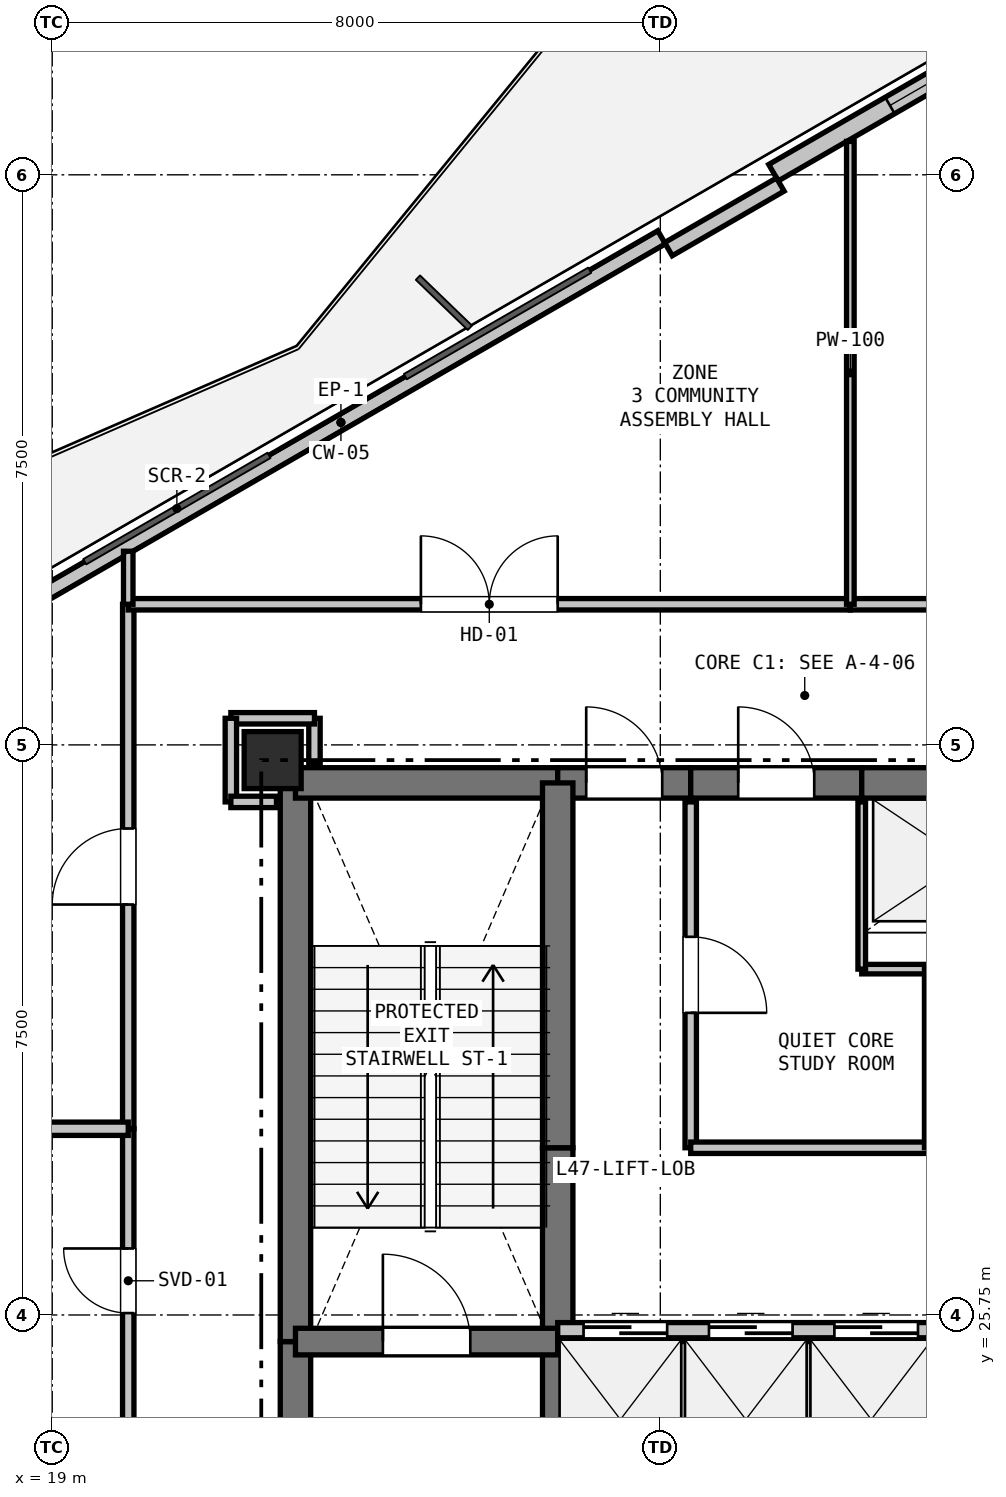
"""IFC4 building model, lengths in metres.
Left out: names, types, materials, properties, quantities, classifications, styles, units other than length and angle.
Written with IfcOpenShell. Run it as: python <this file> out.ifc"""

import sys

from ifc_helpers import new_model, si_unit, direction, frame, frame_2d, origin, origin_2d, place, context, subcontext, project, spatial, rectangle, extrude, element, fill, save


model = new_model("IFC4")
c1 = context("Model", 3, precision=1e-05, world=origin(), true_north=direction((0.0, 1.0)))
c2 = subcontext(c1, "Body", "Model", "MODEL_VIEW")
j1 = project(units=[si_unit("LENGTHUNIT", "METRE"), si_unit("PLANEANGLEUNIT", "RADIAN")], contexts=[c1])
p1 = place(None, origin())
s1 = spatial("IfcSite", under=j1, at=p1, CompositionType="ELEMENT")
p2 = place(p1, origin())
s2 = spatial("IfcBuilding", under=s1, at=p2, CompositionType="ELEMENT")
p3 = place(p2, frame((0.0, 0.0, 170.7)))
s3 = spatial("IfcBuildingStorey", under=s2, at=p3, CompositionType="ELEMENT", Elevation=170.7)
p4 = place(p3, frame((21.9, 33.05, 0.0), z_axis=(0.0, 0.0, 1.0), x_axis=(1.0, 0.0, 0.0)))
e1 = element("IfcColumn", 1, at=p4, inside=s3, PredefinedType="COLUMN", context=c2, shape_type="SweptSolid", body=[
    extrude(rectangle(XDim=0.75, YDim=0.75, at=origin_2d()), origin(), (0.0, 0.0, 1.0), 4.8),
])
p5 = place(p3, frame((18.58, 35.056, 0.0), z_axis=(0.0, 0.0, 1.0), x_axis=(0.866026169916, 0.499998673018, 0.0)))
e2 = element("IfcWall", 2, at=p5, inside=s3, PredefinedType="PARAPET", context=c2, shape_type="SweptSolid", body=[
    extrude(rectangle(XDim=9.742, YDim=0.2, at=frame_2d((4.871, 0.0))), origin(), (0.0, 0.0, 1.0), 0.2),
])
p6 = place(p3, frame((28.489, 40.778, 0.0), z_axis=(0.0, 0.0, 1.0), x_axis=(0.866027516296, 0.499996341005, 0.0)))
e3 = element("IfcWall", 3, at=p6, inside=s3, PredefinedType="SOLIDWALL", context=c2, shape_type="SweptSolid", body=[
    extrude(rectangle(XDim=10.442, YDim=0.25, at=frame_2d((5.221, 0.0))), origin(), (0.0, 0.0, 1.0), 3.205),
])
p7 = place(p6, frame((1.769, 0.0, 0.9)))
e4 = element("IfcOpeningElement", 4, at=p7, cuts=e3, PredefinedType="OPENING", context=c2, shape_type="SweptSolid", body=[
    extrude(rectangle(XDim=2.4, YDim=2.2, at=frame_2d((1.2, 1.1))), frame((0.0, 0.135, 0.0), z_axis=(0.0, -1.0, 0.0), x_axis=(1.0, 0.0, 0.0)), (0.0, 0.0, 1.0), 0.27),
])
p8 = place(p3, frame((27.107, 39.772, 0.0), z_axis=(0.0, 0.0, 1.0), x_axis=(0.866087547558, 0.499892348375, 0.0)))
e5 = element("IfcWall", 5, at=p8, inside=s3, PredefinedType="PARAPET", context=c2, shape_type="SweptSolid", body=[
    extrude(rectangle(XDim=1.7, YDim=0.2, at=frame_2d((0.85, 0.0))), origin(), (0.0, 0.0, 1.0), 4.19),
])
p9 = place(p3, frame((22.2, 20.75, 0.0), z_axis=(0.0, 0.0, 1.0), x_axis=(0.0, 1.0, 0.0)))
e6 = element("IfcWall", 6, at=p9, inside=s3, PredefinedType="SHEAR", context=c2, shape_type="SweptSolid", body=[
    extrude(rectangle(XDim=4.65, YDim=0.4, at=frame_2d((2.325, 0.0))), origin(), (0.0, 0.0, 1.0), 4.57),
])
p10 = place(p3, frame((22.2, 25.4, 0.0), z_axis=(0.0, 0.0, 1.0), x_axis=(0.0, 1.0, 0.0)))
e7 = element("IfcWall", 7, at=p10, inside=s3, PredefinedType="SHEAR", context=c2, shape_type="SweptSolid", body=[
    extrude(rectangle(XDim=7.35, YDim=0.4, at=frame_2d((3.675, 0.0))), origin(), (0.0, 0.0, 1.0), 4.57),
])
p11 = place(p3, frame((22.2, 32.75, 0.0), z_axis=(0.0, 0.0, 1.0), x_axis=(1.0, 0.0, 0.0)))
e8 = element("IfcWall", 8, at=p11, inside=s3, PredefinedType="SHEAR", context=c2, shape_type="SweptSolid", body=[
    extrude(rectangle(XDim=3.45, YDim=0.4, at=frame_2d((1.725, 0.0))), origin(), (0.0, 0.0, 1.0), 4.57),
])
p12 = place(p3, frame((25.65, 32.75, 0.0), z_axis=(0.0, 0.0, 1.0), x_axis=(1.0, 0.0, 0.0)))
e9 = element("IfcWall", 9, at=p12, inside=s3, PredefinedType="SHEAR", context=c2, shape_type="SweptSolid", body=[
    extrude(rectangle(XDim=1.75, YDim=0.4, at=frame_2d((0.875, 0.0))), origin(), (0.0, 0.0, 1.0), 4.57),
])
p13 = place(p12, frame((0.375, 0.0, 0.0)))
e10 = element("IfcOpeningElement", 10, at=p13, cuts=e9, PredefinedType="OPENING", context=c2, shape_type="SweptSolid", body=[
    extrude(rectangle(XDim=1.0, YDim=2.15, at=frame_2d((0.5, 1.075))), frame((0.0, 0.21, 0.0), z_axis=(0.0, -1.0, 0.0), x_axis=(1.0, 0.0, 0.0)), (0.0, 0.0, 1.0), 0.42),
])
p14 = place(p3, frame((27.4, 32.75, 0.0), z_axis=(0.0, 0.0, 1.0), x_axis=(1.0, 0.0, 0.0)))
e11 = element("IfcWall", 11, at=p14, inside=s3, PredefinedType="SHEAR", context=c2, shape_type="SweptSolid", body=[
    extrude(rectangle(XDim=2.25, YDim=0.4, at=frame_2d((1.125, 0.0))), origin(), (0.0, 0.0, 1.0), 4.57),
])
p15 = place(p14, frame((0.625, 0.0, 0.0)))
e12 = element("IfcOpeningElement", 12, at=p15, cuts=e11, PredefinedType="OPENING", context=c2, shape_type="SweptSolid", body=[
    extrude(rectangle(XDim=1.0, YDim=2.15, at=frame_2d((0.5, 1.075))), frame((0.0, 0.21, 0.0), z_axis=(0.0, -1.0, 0.0), x_axis=(1.0, 0.0, 0.0)), (0.0, 0.0, 1.0), 0.42),
])
p16 = place(p3, frame((29.65, 32.75, 0.0), z_axis=(0.0, 0.0, 1.0), x_axis=(1.0, 0.0, 0.0)))
e13 = element("IfcWall", 13, at=p16, inside=s3, PredefinedType="SHEAR", context=c2, shape_type="SweptSolid", body=[
    extrude(rectangle(XDim=2.7, YDim=0.4, at=frame_2d((1.35, 0.0))), origin(), (0.0, 0.0, 1.0), 4.57),
])
p17 = place(p3, frame((25.65, 22.75, 0.0), z_axis=(0.0, 0.0, 1.0), x_axis=(0.0, 1.0, 0.0)))
e14 = element("IfcWall", 14, at=p17, inside=s3, PredefinedType="SHEAR", context=c2, shape_type="SweptSolid", body=[
    extrude(rectangle(XDim=2.8, YDim=0.4, at=frame_2d((1.4, 0.0))), origin(), (0.0, 0.0, 1.0), 4.57),
])
p18 = place(p3, frame((25.65, 25.55, 0.0), z_axis=(0.0, 0.0, 1.0), x_axis=(0.0, 1.0, 0.0)))
e15 = element("IfcWall", 15, at=p18, inside=s3, PredefinedType="SHEAR", context=c2, shape_type="SweptSolid", body=[
    extrude(rectangle(XDim=2.4, YDim=0.4, at=frame_2d((1.2, 0.0))), origin(), (0.0, 0.0, 1.0), 4.57),
])
p19 = place(p3, frame((25.65, 27.95, 0.0), z_axis=(0.0, 0.0, 1.0), x_axis=(0.0, 1.0, 0.0)))
e16 = element("IfcWall", 16, at=p19, inside=s3, PredefinedType="SHEAR", context=c2, shape_type="SweptSolid", body=[
    extrude(rectangle(XDim=4.8, YDim=0.4, at=frame_2d((2.4, 0.0))), origin(), (0.0, 0.0, 1.0), 4.57),
])
p20 = place(p3, frame((22.2, 25.4, 0.0), z_axis=(0.0, 0.0, 1.0), x_axis=(1.0, 0.0, 0.0)))
e17 = element("IfcWall", 17, at=p20, inside=s3, PredefinedType="SHEAR", context=c2, shape_type="SweptSolid", body=[
    extrude(rectangle(XDim=3.45, YDim=0.35, at=frame_2d((1.725, 0.0))), origin(), (0.0, 0.0, 1.0), 4.57),
])
p21 = place(p20, frame((1.15, 0.0, 0.0)))
e18 = element("IfcOpeningElement", 18, at=p21, cuts=e17, PredefinedType="OPENING", context=c2, shape_type="SweptSolid", body=[
    extrude(rectangle(XDim=1.15, YDim=2.15, at=frame_2d((0.575, 1.075))), frame((0.0, 0.185, 0.0), z_axis=(0.0, -1.0, 0.0), x_axis=(1.0, 0.0, 0.0)), (0.0, 0.0, 1.0), 0.37),
])
p22 = place(p3, frame((25.65, 25.55, 0.0), z_axis=(0.0, 0.0, 1.0), x_axis=(1.0, 0.0, 0.0)))
e19 = element("IfcWall", 19, at=p22, inside=s3, PredefinedType="PARTITIONING", context=c2, shape_type="SweptSolid", body=[
    extrude(rectangle(XDim=4.95, YDim=0.2, at=frame_2d((2.475, 0.0))), origin(), (0.0, 0.0, 1.0), 4.57),
])
p23 = place(p22, frame((0.34, 0.0, 0.0)))
e20 = element("IfcOpeningElement", 20, at=p23, cuts=e19, PredefinedType="OPENING", context=c2, shape_type="SweptSolid", body=[
    extrude(rectangle(XDim=1.1, YDim=2.15, at=frame_2d((0.55, 1.075))), frame((0.0, 0.11, 0.0), z_axis=(0.0, -1.0, 0.0), x_axis=(1.0, 0.0, 0.0)), (0.0, 0.0, 1.0), 0.22),
])
p24 = place(p22, frame((1.99, 0.0, 0.0)))
e21 = element("IfcOpeningElement", 21, at=p24, cuts=e19, PredefinedType="OPENING", context=c2, shape_type="SweptSolid", body=[
    extrude(rectangle(XDim=1.1, YDim=2.15, at=frame_2d((0.55, 1.075))), frame((0.0, 0.11, 0.0), z_axis=(0.0, -1.0, 0.0), x_axis=(1.0, 0.0, 0.0)), (0.0, 0.0, 1.0), 0.22),
])
p25 = place(p22, frame((3.64, 0.0, 0.0)))
e22 = element("IfcOpeningElement", 22, at=p25, cuts=e19, PredefinedType="OPENING", context=c2, shape_type="SweptSolid", body=[
    extrude(rectangle(XDim=1.1, YDim=2.15, at=frame_2d((0.55, 1.075))), frame((0.0, 0.11, 0.0), z_axis=(0.0, -1.0, 0.0), x_axis=(1.0, 0.0, 0.0)), (0.0, 0.0, 1.0), 0.22),
])
p26 = place(p3, frame((30.55, 30.3, 0.0), z_axis=(0.0, 0.0, 1.0), x_axis=(-1.0, 0.0, 0.0)))
e23 = element("IfcWall", 23, at=p26, inside=s3, PredefinedType="PARTITIONING", context=c2, shape_type="SweptSolid", body=[
    extrude(rectangle(XDim=0.9, YDim=0.125, at=frame_2d((0.45, 0.0))), origin(), (0.0, 0.0, 1.0), 4.57),
])
p27 = place(p3, frame((29.65, 30.3, 0.0), z_axis=(0.0, 0.0, 1.0), x_axis=(0.0, 1.0, 0.0)))
e24 = element("IfcWall", 24, at=p27, inside=s3, PredefinedType="PARTITIONING", context=c2, shape_type="SweptSolid", body=[
    extrude(rectangle(XDim=2.2, YDim=0.1, at=frame_2d((1.1, 0.0))), origin(), (0.0, 0.0, 1.0), 4.57),
])
p28 = place(p3, frame((27.3, 25.4, 0.0), z_axis=(0.0, 0.0, 1.0), x_axis=(0.0, -1.0, 0.0)))
e25 = element("IfcWall", 25, at=p28, inside=s3, PredefinedType="PARTITIONING", context=c2, shape_type="SweptSolid", body=[
    extrude(rectangle(XDim=2.2, YDim=0.125, at=frame_2d((1.1, 0.0))), origin(), (0.0, 0.0, 1.0), 4.57),
])
p29 = place(p3, frame((28.95, 25.4, 0.0), z_axis=(0.0, 0.0, 1.0), x_axis=(0.0, -1.0, 0.0)))
e26 = element("IfcWall", 26, at=p29, inside=s3, PredefinedType="PARTITIONING", context=c2, shape_type="SweptSolid", body=[
    extrude(rectangle(XDim=2.2, YDim=0.1, at=frame_2d((1.1, 0.0))), origin(), (0.0, 0.0, 1.0), 4.57),
])
p30 = place(p3, frame((27.4, 32.5, 0.0), z_axis=(0.0, 0.0, 1.0), x_axis=(0.0, -1.0, 0.0)))
e27 = element("IfcWall", 27, at=p30, inside=s3, PredefinedType="PARTITIONING", context=c2, shape_type="SweptSolid", body=[
    extrude(rectangle(XDim=4.55, YDim=0.15, at=frame_2d((2.275, 0.0))), origin(), (0.0, 0.0, 1.0), 4.57),
])
p31 = place(p30, frame((1.775, 0.0, 0.0)))
e28 = element("IfcOpeningElement", 28, at=p31, cuts=e27, PredefinedType="OPENING", context=c2, shape_type="SweptSolid", body=[
    extrude(rectangle(XDim=1.0, YDim=2.15, at=frame_2d((0.5, 1.075))), frame((0.0, 0.085, 0.0), z_axis=(0.0, -1.0, 0.0), x_axis=(1.0, 0.0, 0.0)), (0.0, 0.0, 1.0), 0.17),
])
p32 = place(p3, frame((27.4, 27.95, 0.0), z_axis=(0.0, 0.0, 1.0), x_axis=(1.0, 0.0, 0.0)))
e29 = element("IfcWall", 29, at=p32, inside=s3, PredefinedType="PARTITIONING", context=c2, shape_type="SweptSolid", body=[
    extrude(rectangle(XDim=3.15, YDim=0.15, at=frame_2d((1.575, 0.0))), origin(), (0.0, 0.0, 1.0), 4.57),
])
p33 = place(p3, frame((20.0, 24.2, 0.0), z_axis=(0.0, 0.0, 1.0), x_axis=(0.0, 1.0, 0.0)))
e30 = element("IfcWall", 30, at=p33, inside=s3, PredefinedType="PARTITIONING", context=c2, shape_type="SweptSolid", body=[
    extrude(rectangle(XDim=4.0, YDim=0.15, at=frame_2d((2.0, 0.0))), origin(), (0.0, 0.0, 1.0), 3.205),
])
p34 = place(p33, frame((1.575, 0.0, 0.0)))
e31 = element("IfcOpeningElement", 31, at=p34, cuts=e30, PredefinedType="OPENING", context=c2, shape_type="SweptSolid", body=[
    extrude(rectangle(XDim=0.85, YDim=2.1, at=frame_2d((0.425, 1.05))), frame((0.0, 0.085, 0.0), z_axis=(0.0, -1.0, 0.0), x_axis=(1.0, 0.0, 0.0)), (0.0, 0.0, 1.0), 0.17),
])
p35 = place(p3, frame((20.0, 28.2, 0.0), z_axis=(0.0, 0.0, 1.0), x_axis=(0.0, 1.0, 0.0)))
e32 = element("IfcWall", 32, at=p35, inside=s3, PredefinedType="PARTITIONING", context=c2, shape_type="SweptSolid", body=[
    extrude(rectangle(XDim=6.9, YDim=0.15, at=frame_2d((3.45, 0.0))), origin(), (0.0, 0.0, 1.0), 2.365),
])
p36 = place(p35, frame((2.95, 0.0, 0.0)))
e33 = element("IfcOpeningElement", 33, at=p36, cuts=e32, PredefinedType="OPENING", context=c2, shape_type="SweptSolid", body=[
    extrude(rectangle(XDim=1.0, YDim=2.15, at=frame_2d((0.5, 1.075))), frame((0.0, 0.085, 0.0), z_axis=(0.0, -1.0, 0.0), x_axis=(1.0, 0.0, 0.0)), (0.0, 0.0, 1.0), 0.17),
])
p37 = place(p3, frame((20.0, 35.1, 0.0), z_axis=(0.0, 0.0, 1.0), x_axis=(1.0, 0.0, 0.0)))
e34 = element("IfcWall", 34, at=p37, inside=s3, PredefinedType="PARTITIONING", context=c2, shape_type="SweptSolid", body=[
    extrude(rectangle(XDim=9.5, YDim=0.15, at=frame_2d((4.75, 0.0))), origin(), (0.0, 0.0, 1.0), 2.365),
])
p38 = place(p37, frame((3.85, 0.0, 0.0)))
e35 = element("IfcOpeningElement", 35, at=p38, cuts=e34, PredefinedType="OPENING", context=c2, shape_type="SweptSolid", body=[
    extrude(rectangle(XDim=1.8, YDim=2.2, at=frame_2d((0.9, 1.1))), frame((0.0, 0.085, 0.0), z_axis=(0.0, -1.0, 0.0), x_axis=(1.0, 0.0, 0.0)), (0.0, 0.0, 1.0), 0.17),
])
p39 = place(p3, frame((29.5, 35.1, 0.0), z_axis=(0.0, 0.0, 1.0), x_axis=(1.0, 0.0, 0.0)))
e36 = element("IfcWall", 36, at=p39, inside=s3, PredefinedType="PARTITIONING", context=c2, shape_type="SweptSolid", body=[
    extrude(rectangle(XDim=6.3, YDim=0.15, at=frame_2d((3.15, 0.0))), origin(), (0.0, 0.0, 1.0), 3.205),
])
p40 = place(p39, frame((2.25, 0.0, 0.0)))
e37 = element("IfcOpeningElement", 37, at=p40, cuts=e36, PredefinedType="OPENING", context=c2, shape_type="SweptSolid", body=[
    extrude(rectangle(XDim=1.8, YDim=2.2, at=frame_2d((0.9, 1.1))), frame((0.0, 0.085, 0.0), z_axis=(0.0, -1.0, 0.0), x_axis=(1.0, 0.0, 0.0)), (0.0, 0.0, 1.0), 0.17),
])
p41 = place(p3, frame((22.45, 33.0, 0.0), z_axis=(0.0, 0.0, 1.0), x_axis=(0.0, 1.0, 0.0)))
e38 = element("IfcWall", 38, at=p41, inside=s3, PredefinedType="PARTITIONING", context=c2, shape_type="SweptSolid", body=[
    extrude(rectangle(XDim=0.6, YDim=0.15, at=frame_2d((0.3, 0.0))), origin(), (0.0, 0.0, 1.0), 4.095),
])
p42 = place(p3, frame((22.45, 33.6, 0.0), z_axis=(0.0, 0.0, 1.0), x_axis=(-1.0, 0.0, 0.0)))
e39 = element("IfcWall", 39, at=p42, inside=s3, PredefinedType="PARTITIONING", context=c2, shape_type="SweptSolid", body=[
    extrude(rectangle(XDim=1.1, YDim=0.15, at=frame_2d((0.55, 0.0))), origin(), (0.0, 0.0, 1.0), 4.57),
])
p43 = place(p3, frame((21.35, 33.6, 0.0), z_axis=(0.0, 0.0, 1.0), x_axis=(0.0, -1.0, 0.0)))
e40 = element("IfcWall", 40, at=p43, inside=s3, PredefinedType="PARTITIONING", context=c2, shape_type="SweptSolid", body=[
    extrude(rectangle(XDim=1.1, YDim=0.15, at=frame_2d((0.55, 0.0))), origin(), (0.0, 0.0, 1.0), 4.57),
])
p44 = place(p3, frame((21.35, 32.5, 0.0), z_axis=(0.0, 0.0, 1.0), x_axis=(1.0, 0.0, 0.0)))
e41 = element("IfcWall", 41, at=p44, inside=s3, PredefinedType="PARTITIONING", context=c2, shape_type="SweptSolid", body=[
    extrude(rectangle(XDim=0.6, YDim=0.15, at=frame_2d((0.3, 0.0))), origin(), (0.0, 0.0, 1.0), 4.095),
])
p45 = place(p3, frame((8.083, 28.2, 0.0), z_axis=(0.0, 0.0, 1.0), x_axis=(1.0, 0.0, 0.0)))
e42 = element("IfcWall", 42, at=p45, inside=s3, PredefinedType="PLUMBINGWALL", context=c2, shape_type="SweptSolid", body=[
    extrude(rectangle(XDim=11.917, YDim=0.175, at=frame_2d((5.958, 0.0))), origin(), (0.0, 0.0, 1.0), 3.205),
])
p46 = place(p3, frame((30.55, 30.3, 0.0), z_axis=(0.0, 0.0, 1.0), x_axis=(0.0, -1.0, 0.0)))
e43 = element("IfcWall", 43, at=p46, inside=s3, PredefinedType="PARTITIONING", context=c2, shape_type="SweptSolid", body=[
    extrude(rectangle(XDim=2.35, YDim=0.15, at=frame_2d((1.175, 0.0))), origin(), (0.0, 0.0, 1.0), 4.57),
])
p47 = place(p3, frame((20.0, 35.1, 0.0), z_axis=(0.0, 0.0, 1.0), x_axis=(0.0, 1.0, 0.0)))
e44 = element("IfcWall", 44, at=p47, inside=s3, PredefinedType="PARTITIONING", context=c2, shape_type="SweptSolid", body=[
    extrude(rectangle(XDim=0.698, YDim=0.125, at=frame_2d((0.349, 0.0))), origin(), (0.0, 0.0, 1.0), 2.365),
])
p48 = place(p3, frame((29.5, 41.189, 0.0), z_axis=(0.0, 0.0, 1.0), x_axis=(0.0, -1.0, 0.0)))
e45 = element("IfcWall", 45, at=p48, inside=s3, PredefinedType="PARTITIONING", context=c2, shape_type="SweptSolid", body=[
    extrude(rectangle(XDim=6.089, YDim=0.1, at=frame_2d((3.044, 0.0))), origin(), (0.0, 0.0, 1.0), 2.365),
])
p49 = place(p7, origin())
e46 = element("IfcWindow", 46, at=p49, inside=s3, PartitioningType="SINGLE_PANEL", PredefinedType="WINDOW", context=c2, shape_type="SweptSolid", body=[
    extrude(rectangle(XDim=2.4, YDim=2.2, at=frame_2d((1.2, 1.1))), frame((0.0, 0.03, 0.0), z_axis=(0.0, -1.0, 0.0), x_axis=(1.0, 0.0, 0.0)), (0.0, 0.0, 1.0), 0.06),
])
fill(e4, e46)
p50 = place(p23, origin())
e47 = element("IfcDoor", 47, at=p50, inside=s3, OperationType="SLIDING_TO_LEFT", PredefinedType="DOOR", context=c2, shape_type="SweptSolid", body=[
    extrude(rectangle(XDim=1.1, YDim=2.15, at=frame_2d((0.55, 1.075))), frame((0.0, 0.025, 0.0), z_axis=(0.0, -1.0, 0.0), x_axis=(1.0, 0.0, 0.0)), (0.0, 0.0, 1.0), 0.05),
])
fill(e20, e47)
p51 = place(p24, origin())
e48 = element("IfcDoor", 48, at=p51, inside=s3, OperationType="SLIDING_TO_LEFT", PredefinedType="DOOR", context=c2, shape_type="SweptSolid", body=[
    extrude(rectangle(XDim=1.1, YDim=2.15, at=frame_2d((0.55, 1.075))), frame((0.0, 0.025, 0.0), z_axis=(0.0, -1.0, 0.0), x_axis=(1.0, 0.0, 0.0)), (0.0, 0.0, 1.0), 0.05),
])
fill(e21, e48)
p52 = place(p25, origin())
e49 = element("IfcDoor", 49, at=p52, inside=s3, OperationType="SLIDING_TO_LEFT", PredefinedType="DOOR", context=c2, shape_type="SweptSolid", body=[
    extrude(rectangle(XDim=1.1, YDim=2.15, at=frame_2d((0.55, 1.075))), frame((0.0, 0.025, 0.0), z_axis=(0.0, -1.0, 0.0), x_axis=(1.0, 0.0, 0.0)), (0.0, 0.0, 1.0), 0.05),
])
fill(e22, e49)
p53 = place(p13, origin())
e50 = element("IfcDoor", 50, at=p53, inside=s3, OperationType="SINGLE_SWING_LEFT", PredefinedType="DOOR", context=c2, shape_type="SweptSolid", body=[
    extrude(rectangle(XDim=1.0, YDim=2.15, at=frame_2d((0.5, 1.075))), frame((0.0, 0.025, 0.0), z_axis=(0.0, -1.0, 0.0), x_axis=(1.0, 0.0, 0.0)), (0.0, 0.0, 1.0), 0.05),
])
fill(e10, e50)
p54 = place(p21, origin())
e51 = element("IfcDoor", 51, at=p54, inside=s3, OperationType="SINGLE_SWING_LEFT", PredefinedType="DOOR", context=c2, shape_type="SweptSolid", body=[
    extrude(rectangle(XDim=1.15, YDim=2.15, at=frame_2d((0.575, 1.075))), frame((0.0, 0.025, 0.0), z_axis=(0.0, -1.0, 0.0), x_axis=(1.0, 0.0, 0.0)), (0.0, 0.0, 1.0), 0.05),
])
fill(e18, e51)
p55 = place(p31, origin())
e52 = element("IfcDoor", 52, at=p55, inside=s3, OperationType="SINGLE_SWING_RIGHT", PredefinedType="DOOR", context=c2, shape_type="SweptSolid", body=[
    extrude(rectangle(XDim=1.0, YDim=2.15, at=frame_2d((0.5, 1.075))), frame((0.0, 0.025, 0.0), z_axis=(0.0, -1.0, 0.0), x_axis=(1.0, 0.0, 0.0)), (0.0, 0.0, 1.0), 0.05),
])
fill(e28, e52)
p56 = place(p34, origin())
e53 = element("IfcDoor", 53, at=p56, inside=s3, OperationType="SINGLE_SWING_RIGHT", PredefinedType="DOOR", context=c2, shape_type="SweptSolid", body=[
    extrude(rectangle(XDim=0.85, YDim=2.1, at=frame_2d((0.425, 1.05))), frame((0.0, 0.025, 0.0), z_axis=(0.0, -1.0, 0.0), x_axis=(1.0, 0.0, 0.0)), (0.0, 0.0, 1.0), 0.05),
])
fill(e31, e53)
p57 = place(p15, origin())
e54 = element("IfcDoor", 54, at=p57, inside=s3, OperationType="SINGLE_SWING_LEFT", PredefinedType="DOOR", context=c2, shape_type="SweptSolid", body=[
    extrude(rectangle(XDim=1.0, YDim=2.15, at=frame_2d((0.5, 1.075))), frame((0.0, 0.025, 0.0), z_axis=(0.0, -1.0, 0.0), x_axis=(1.0, 0.0, 0.0)), (0.0, 0.0, 1.0), 0.05),
])
fill(e12, e54)
p58 = place(p38, origin())
e55 = element("IfcDoor", 55, at=p58, inside=s3, OperationType="DOUBLE_DOOR_SINGLE_SWING", PredefinedType="DOOR", context=c2, shape_type="SweptSolid", body=[
    extrude(rectangle(XDim=1.8, YDim=2.2, at=frame_2d((0.9, 1.1))), frame((0.0, 0.025, 0.0), z_axis=(0.0, -1.0, 0.0), x_axis=(1.0, 0.0, 0.0)), (0.0, 0.0, 1.0), 0.05),
])
fill(e35, e55)
p59 = place(p36, origin())
e56 = element("IfcDoor", 56, at=p59, inside=s3, OperationType="SINGLE_SWING_LEFT", PredefinedType="DOOR", context=c2, shape_type="SweptSolid", body=[
    extrude(rectangle(XDim=1.0, YDim=2.15, at=frame_2d((0.5, 1.075))), frame((0.0, 0.025, 0.0), z_axis=(0.0, -1.0, 0.0), x_axis=(1.0, 0.0, 0.0)), (0.0, 0.0, 1.0), 0.05),
])
fill(e33, e56)
save(model, sys.argv[1])
